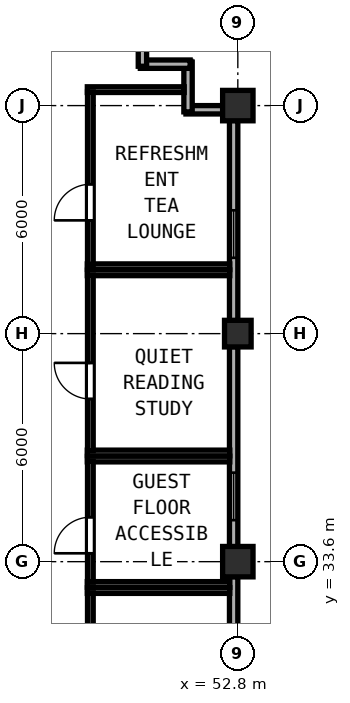
"""IFC4 building model, lengths in metres.
Left out: names, types, materials, properties, quantities, classifications, styles, units other than length and angle.
Written with IfcOpenShell. Run it as: python <this file> out.ifc"""

import sys

from ifc_helpers import new_model, si_unit, direction, frame, frame_2d, origin, origin_2d, place, context, subcontext, project, spatial, rectangle, hollow_rectangle, extrude, element, fill, save


model = new_model("IFC4")
c1 = context("Model", 3, precision=1e-05, world=origin(), true_north=direction((0.0, 1.0)))
c2 = subcontext(c1, "Body", "Model", "MODEL_VIEW")
j1 = project(units=[si_unit("LENGTHUNIT", "METRE"), si_unit("PLANEANGLEUNIT", "RADIAN")], contexts=[c1])
p1 = place(None, origin())
s1 = spatial("IfcSite", under=j1, at=p1, CompositionType="ELEMENT")
p2 = place(p1, origin())
s2 = spatial("IfcBuilding", under=s1, at=p2, CompositionType="ELEMENT")
p3 = place(p2, frame((0.0, 0.0, 262.15)))
s3 = spatial("IfcBuildingStorey", under=s2, at=p3, CompositionType="ELEMENT", Elevation=262.15)
for number, where, z_axis, x_axis in (
    (1, (52.8, 33.6, 0.0), (0.0, 0.0, 1.0), (1.0, 0.0, 0.0)),
    (2, (52.8, 45.6, 0.0), (0.0, 0.0, 1.0), (1.0, 0.0, 0.0)),
):
    element("IfcColumn", number, at=place(p3, frame(where, z_axis=z_axis, x_axis=x_axis)), inside=s3, PredefinedType="COLUMN", context=c2, shape_type="SweptSolid", body=[
        extrude(hollow_rectangle(XDim=0.8, YDim=0.8, WallThickness=0.03, at=origin_2d()), origin(), (0.0, 0.0, 1.0), 3.85),
    ])
p4 = place(p3, frame((52.8, 39.6, 0.0), z_axis=(0.0, 0.0, 1.0), x_axis=(1.0, 0.0, 0.0)))
e3 = element("IfcColumn", 3, at=p4, inside=s3, PredefinedType="COLUMN", context=c2, shape_type="SweptSolid", body=[
    extrude(hollow_rectangle(XDim=0.7, YDim=0.7, WallThickness=0.026, at=origin_2d()), origin(), (0.0, 0.0, 1.0), 3.85),
])
p5 = place(p3, frame((52.69, 27.942, 0.0), z_axis=(0.0, 0.0, 1.0), x_axis=(0.0, 1.0, 0.0)))
e4 = element("IfcWall", 4, at=p5, inside=s3, PredefinedType="SOLIDWALL", context=c2, shape_type="SweptSolid", body=[
    extrude(rectangle(XDim=5.266, YDim=0.22, at=frame_2d((2.633, 0.0))), origin(), (0.0, 0.0, 1.0), 3.315),
])
p6 = place(p5, frame((0.7, 0.0, 0.85)))
e5 = element("IfcOpeningElement", 5, at=p6, cuts=e4, PredefinedType="OPENING", context=c2, shape_type="SweptSolid", body=[
    extrude(rectangle(XDim=1.25, YDim=1.95, at=frame_2d((0.625, 0.975))), frame((0.0, 0.12, 0.0), z_axis=(0.0, -1.0, 0.0), x_axis=(1.0, 0.0, 0.0)), (0.0, 0.0, 1.0), 0.24),
])
p7 = place(p3, frame((52.69, 33.992, 0.0), z_axis=(0.0, 0.0, 1.0), x_axis=(0.0, 1.0, 0.0)))
e6 = element("IfcWall", 6, at=p7, inside=s3, PredefinedType="SOLIDWALL", context=c2, shape_type="SweptSolid", body=[
    extrude(rectangle(XDim=5.266, YDim=0.22, at=frame_2d((2.633, 0.0))), origin(), (0.0, 0.0, 1.0), 3.315),
])
p8 = place(p7, frame((0.7, 0.0, 0.85)))
e7 = element("IfcOpeningElement", 7, at=p8, cuts=e6, PredefinedType="OPENING", context=c2, shape_type="SweptSolid", body=[
    extrude(rectangle(XDim=1.25, YDim=1.95, at=frame_2d((0.625, 0.975))), frame((0.0, 0.12, 0.0), z_axis=(0.0, -1.0, 0.0), x_axis=(1.0, 0.0, 0.0)), (0.0, 0.0, 1.0), 0.24),
])
p9 = place(p3, frame((52.69, 39.942, 0.0), z_axis=(0.0, 0.0, 1.0), x_axis=(0.0, 1.0, 0.0)))
e8 = element("IfcWall", 8, at=p9, inside=s3, PredefinedType="SOLIDWALL", context=c2, shape_type="SweptSolid", body=[
    extrude(rectangle(XDim=5.266, YDim=0.22, at=frame_2d((2.633, 0.0))), origin(), (0.0, 0.0, 1.0), 3.315),
])
p10 = place(p9, frame((1.653, 0.0, 0.85)))
e9 = element("IfcOpeningElement", 9, at=p10, cuts=e8, PredefinedType="OPENING", context=c2, shape_type="SweptSolid", body=[
    extrude(rectangle(XDim=1.25, YDim=1.95, at=frame_2d((0.625, 0.975))), frame((0.0, 0.12, 0.0), z_axis=(0.0, -1.0, 0.0), x_axis=(1.0, 0.0, 0.0)), (0.0, 0.0, 1.0), 0.24),
])
p11 = place(p3, frame((52.408, 45.49, 0.0), z_axis=(0.0, 0.0, 1.0), x_axis=(-1.0, 0.0, 0.0)))
e10 = element("IfcWall", 10, at=p11, inside=s3, PredefinedType="SOLIDWALL", context=c2, shape_type="SweptSolid", body=[
    extrude(rectangle(XDim=0.973, YDim=0.22, at=frame_2d((0.486, 0.0))), origin(), (0.0, 0.0, 1.0), 3.67),
])
p12 = place(p3, frame((51.49, 45.435, 0.0), z_axis=(0.0, 0.0, 1.0), x_axis=(0.0, 1.0, 0.0)))
e11 = element("IfcWall", 11, at=p12, inside=s3, PredefinedType="SOLIDWALL", context=c2, shape_type="SweptSolid", body=[
    extrude(rectangle(XDim=1.31, YDim=0.22, at=frame_2d((0.655, 0.0))), origin(), (0.0, 0.0, 1.0), 3.67),
])
p13 = place(p3, frame((51.545, 46.69, 0.0), z_axis=(0.0, 0.0, 1.0), x_axis=(-1.0, 0.0, 0.0)))
e12 = element("IfcWall", 12, at=p13, inside=s3, PredefinedType="SOLIDWALL", context=c2, shape_type="SweptSolid", body=[
    extrude(rectangle(XDim=1.31, YDim=0.22, at=frame_2d((0.655, 0.0))), origin(), (0.0, 0.0, 1.0), 3.67),
])
p14 = place(p3, frame((50.29, 46.635, 0.0), z_axis=(0.0, 0.0, 1.0), x_axis=(0.0, 1.0, 0.0)))
e13 = element("IfcWall", 13, at=p14, inside=s3, PredefinedType="SOLIDWALL", context=c2, shape_type="SweptSolid", body=[
    extrude(rectangle(XDim=1.535, YDim=0.22, at=frame_2d((0.768, 0.0))), origin(), (0.0, 0.0, 1.0), 3.67),
])
for number, where, z_axis, x_axis in (
    (14, (48.84, 36.3, 0.0), (0.0, 0.0, 1.0), (1.0, 0.0, 0.0)),
    (15, (48.84, 33.0, 0.0), (0.0, 0.0, 1.0), (1.0, 0.0, 0.0)),
):
    element("IfcWall", number, at=place(p3, frame(where, z_axis=z_axis, x_axis=x_axis)), inside=s3, PredefinedType="PARTITIONING", context=c2, shape_type="SweptSolid", body=[
        extrude(rectangle(XDim=3.748, YDim=0.15, at=frame_2d((1.874, 0.0))), origin(), (0.0, 0.0, 1.0), 3.67),
    ])
p15 = place(p3, frame((48.92, 33.06, 0.0), z_axis=(0.0, 0.0, 1.0), x_axis=(0.0, 1.0, 0.0)))
e16 = element("IfcWall", 16, at=p15, inside=s3, PredefinedType="PARTITIONING", context=c2, shape_type="SweptSolid", body=[
    extrude(rectangle(XDim=3.18, YDim=0.15, at=frame_2d((1.59, 0.0))), origin(), (0.0, 0.0, 1.0), 3.67),
])
p16 = place(p15, frame((0.76, 0.0, 0.0)))
e17 = element("IfcOpeningElement", 17, at=p16, cuts=e16, PredefinedType="OPENING", context=c2, shape_type="SweptSolid", body=[
    extrude(rectangle(XDim=0.95, YDim=2.12, at=frame_2d((0.475, 1.06))), frame((0.0, 0.085, 0.0), z_axis=(0.0, -1.0, 0.0), x_axis=(1.0, 0.0, 0.0)), (0.0, 0.0, 1.0), 0.17),
])
for number, where, z_axis, x_axis in (
    (18, (48.84, 41.2, 0.0), (0.0, 0.0, 1.0), (1.0, 0.0, 0.0)),
    (19, (48.84, 36.46, 0.0), (0.0, 0.0, 1.0), (1.0, 0.0, 0.0)),
):
    element("IfcWall", number, at=place(p3, frame(where, z_axis=z_axis, x_axis=x_axis)), inside=s3, PredefinedType="PARTITIONING", context=c2, shape_type="SweptSolid", body=[
        extrude(rectangle(XDim=3.748, YDim=0.15, at=frame_2d((1.874, 0.0))), origin(), (0.0, 0.0, 1.0), 3.67),
    ])
p17 = place(p3, frame((48.92, 36.52, 0.0), z_axis=(0.0, 0.0, 1.0), x_axis=(0.0, 1.0, 0.0)))
e20 = element("IfcWall", 20, at=p17, inside=s3, PredefinedType="PARTITIONING", context=c2, shape_type="SweptSolid", body=[
    extrude(rectangle(XDim=4.62, YDim=0.15, at=frame_2d((2.31, 0.0))), origin(), (0.0, 0.0, 1.0), 3.67),
])
p18 = place(p17, frame((1.36, 0.0, 0.0)))
e21 = element("IfcOpeningElement", 21, at=p18, cuts=e20, PredefinedType="OPENING", context=c2, shape_type="SweptSolid", body=[
    extrude(rectangle(XDim=0.95, YDim=2.12, at=frame_2d((0.475, 1.06))), frame((0.0, 0.085, 0.0), z_axis=(0.0, -1.0, 0.0), x_axis=(1.0, 0.0, 0.0)), (0.0, 0.0, 1.0), 0.17),
])
p19 = place(p3, frame((48.84, 46.02, 0.0), z_axis=(0.0, 0.0, 1.0), x_axis=(1.0, 0.0, 0.0)))
e22 = element("IfcWall", 22, at=p19, inside=s3, PredefinedType="PARTITIONING", context=c2, shape_type="SweptSolid", body=[
    extrude(rectangle(XDim=2.548, YDim=0.15, at=frame_2d((1.274, 0.0))), origin(), (0.0, 0.0, 1.0), 3.67),
])
p20 = place(p3, frame((48.84, 41.36, 0.0), z_axis=(0.0, 0.0, 1.0), x_axis=(1.0, 0.0, 0.0)))
e23 = element("IfcWall", 23, at=p20, inside=s3, PredefinedType="PARTITIONING", context=c2, shape_type="SweptSolid", body=[
    extrude(rectangle(XDim=3.748, YDim=0.15, at=frame_2d((1.874, 0.0))), origin(), (0.0, 0.0, 1.0), 3.67),
])
p21 = place(p3, frame((48.92, 41.42, 0.0), z_axis=(0.0, 0.0, 1.0), x_axis=(0.0, 1.0, 0.0)))
e24 = element("IfcWall", 24, at=p21, inside=s3, PredefinedType="PARTITIONING", context=c2, shape_type="SweptSolid", body=[
    extrude(rectangle(XDim=4.54, YDim=0.15, at=frame_2d((2.27, 0.0))), origin(), (0.0, 0.0, 1.0), 3.67),
])
p22 = place(p21, frame((1.16, 0.0, 0.0)))
e25 = element("IfcOpeningElement", 25, at=p22, cuts=e24, PredefinedType="OPENING", context=c2, shape_type="SweptSolid", body=[
    extrude(rectangle(XDim=0.95, YDim=2.12, at=frame_2d((0.475, 1.06))), frame((0.0, 0.085, 0.0), z_axis=(0.0, -1.0, 0.0), x_axis=(1.0, 0.0, 0.0)), (0.0, 0.0, 1.0), 0.17),
])
p23 = place(p3, frame((48.84, 32.84, 0.0), z_axis=(0.0, 0.0, 1.0), x_axis=(1.0, 0.0, 0.0)))
e26 = element("IfcWall", 26, at=p23, inside=s3, PredefinedType="PARTITIONING", context=c2, shape_type="SweptSolid", body=[
    extrude(rectangle(XDim=3.748, YDim=0.15, at=frame_2d((1.874, 0.0))), origin(), (0.0, 0.0, 1.0), 3.67),
])
p24 = place(p3, frame((48.92, 26.41, 0.0), z_axis=(0.0, 0.0, 1.0), x_axis=(0.0, 1.0, 0.0)))
e27 = element("IfcWall", 27, at=p24, inside=s3, PredefinedType="PARTITIONING", context=c2, shape_type="SweptSolid", body=[
    extrude(rectangle(XDim=6.37, YDim=0.15, at=frame_2d((3.185, 0.0))), origin(), (0.0, 0.0, 1.0), 3.67),
])
p25 = place(p24, frame((0.86, 0.0, 0.0)))
e28 = element("IfcOpeningElement", 28, at=p25, cuts=e27, PredefinedType="OPENING", context=c2, shape_type="SweptSolid", body=[
    extrude(rectangle(XDim=0.95, YDim=2.12, at=frame_2d((0.475, 1.06))), frame((0.0, 0.085, 0.0), z_axis=(0.0, -1.0, 0.0), x_axis=(1.0, 0.0, 0.0)), (0.0, 0.0, 1.0), 0.17),
])
p26 = place(p8, origin())
e29 = element("IfcWindow", 29, at=p26, inside=s3, PartitioningType="SINGLE_PANEL", PredefinedType="WINDOW", context=c2, shape_type="SweptSolid", body=[
    extrude(rectangle(XDim=1.25, YDim=1.95, at=frame_2d((0.625, 0.975))), frame((0.0, 0.03, 0.0), z_axis=(0.0, -1.0, 0.0), x_axis=(1.0, 0.0, 0.0)), (0.0, 0.0, 1.0), 0.06),
])
fill(e7, e29)
p27 = place(p10, origin())
e30 = element("IfcWindow", 30, at=p27, inside=s3, PartitioningType="SINGLE_PANEL", PredefinedType="WINDOW", context=c2, shape_type="SweptSolid", body=[
    extrude(rectangle(XDim=1.25, YDim=1.95, at=frame_2d((0.625, 0.975))), frame((0.0, 0.03, 0.0), z_axis=(0.0, -1.0, 0.0), x_axis=(1.0, 0.0, 0.0)), (0.0, 0.0, 1.0), 0.06),
])
fill(e9, e30)
p28 = place(p16, origin())
e31 = element("IfcDoor", 31, at=p28, inside=s3, OperationType="SINGLE_SWING_LEFT", PredefinedType="DOOR", context=c2, shape_type="SweptSolid", body=[
    extrude(rectangle(XDim=0.95, YDim=2.12, at=frame_2d((0.475, 1.06))), frame((0.0, 0.025, 0.0), z_axis=(0.0, -1.0, 0.0), x_axis=(1.0, 0.0, 0.0)), (0.0, 0.0, 1.0), 0.05),
])
fill(e17, e31)
p29 = place(p18, origin())
e32 = element("IfcDoor", 32, at=p29, inside=s3, OperationType="SINGLE_SWING_RIGHT", PredefinedType="DOOR", context=c2, shape_type="SweptSolid", body=[
    extrude(rectangle(XDim=0.95, YDim=2.12, at=frame_2d((0.475, 1.06))), frame((0.0, 0.025, 0.0), z_axis=(0.0, -1.0, 0.0), x_axis=(1.0, 0.0, 0.0)), (0.0, 0.0, 1.0), 0.05),
])
fill(e21, e32)
p30 = place(p22, origin())
e33 = element("IfcDoor", 33, at=p30, inside=s3, OperationType="SINGLE_SWING_LEFT", PredefinedType="DOOR", context=c2, shape_type="SweptSolid", body=[
    extrude(rectangle(XDim=0.95, YDim=2.12, at=frame_2d((0.475, 1.06))), frame((0.0, 0.025, 0.0), z_axis=(0.0, -1.0, 0.0), x_axis=(1.0, 0.0, 0.0)), (0.0, 0.0, 1.0), 0.05),
])
fill(e25, e33)
save(model, sys.argv[1])
